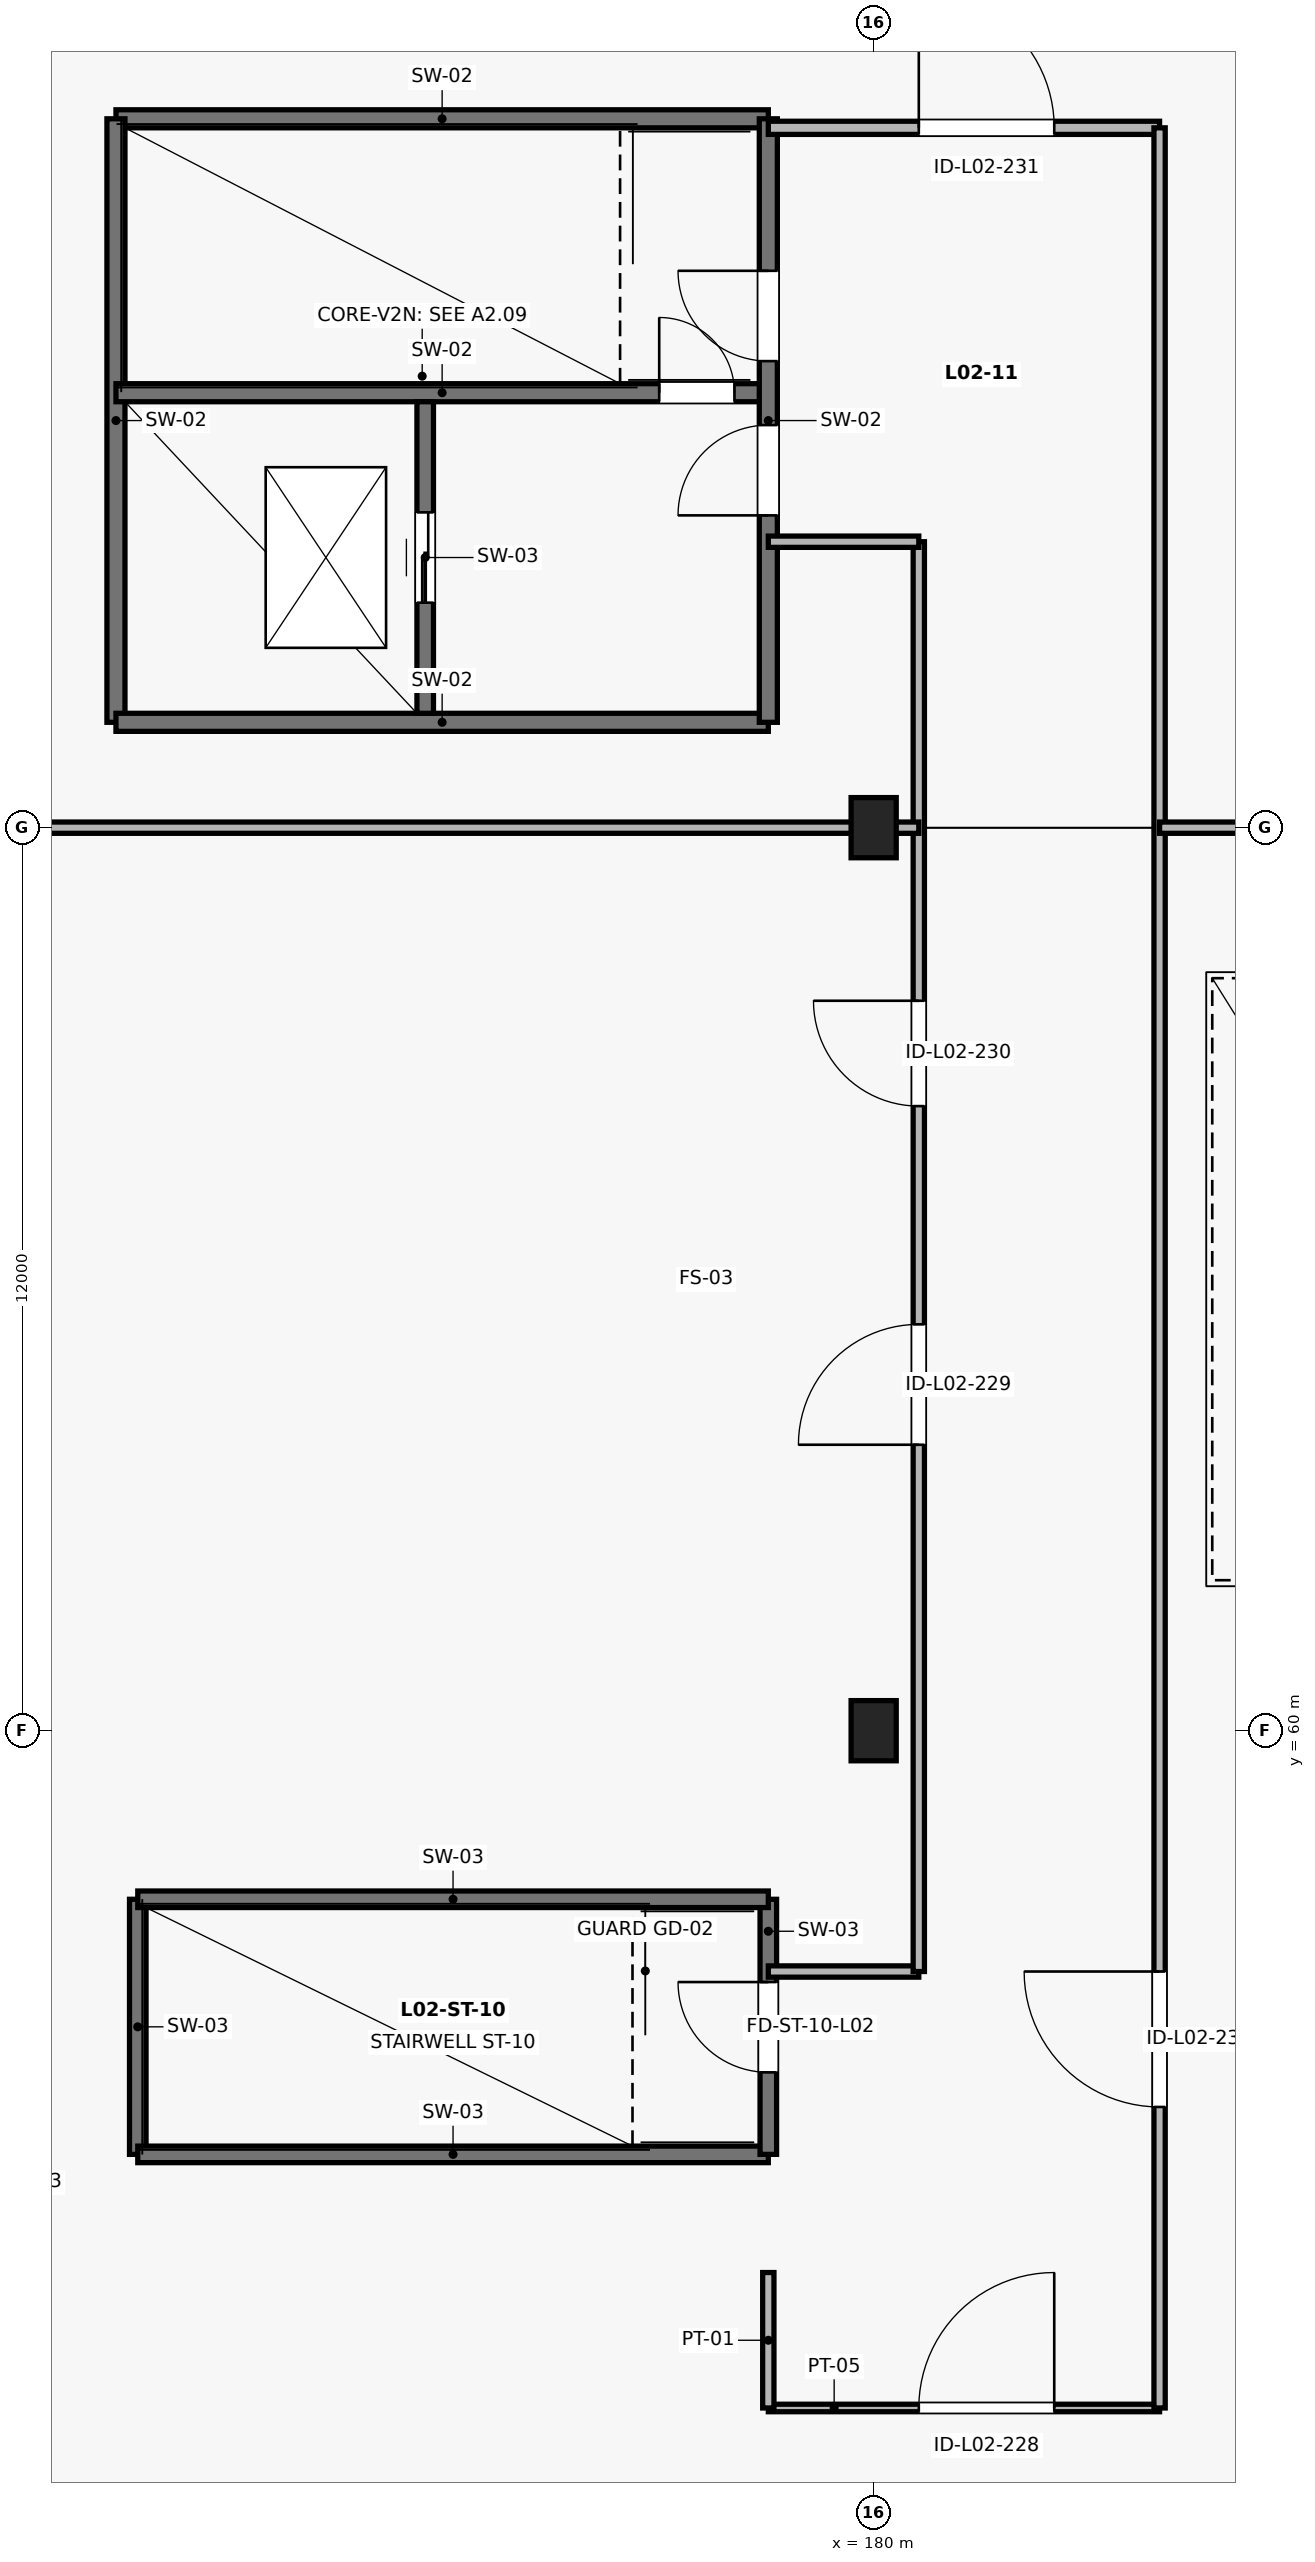
"""IFC4 building model, lengths in metres.
Left out: names, types, materials, properties, quantities, classifications, styles, units other than length and angle.
Written with IfcOpenShell. Run it as: python <this file> out.ifc"""

import sys

from ifc_helpers import new_model, si_unit, direction, frame, frame_2d, origin, origin_2d, place, context, subcontext, project, spatial, rectangle, extrude, element, fill, save


model = new_model("IFC4")
c1 = context("Model", 3, precision=1e-05, world=origin(), true_north=direction((0.0, 1.0)))
c2 = subcontext(c1, "Body", "Model", "MODEL_VIEW")
j1 = project(units=[si_unit("LENGTHUNIT", "METRE"), si_unit("PLANEANGLEUNIT", "RADIAN")], contexts=[c1])
p1 = place(None, origin())
s1 = spatial("IfcSite", under=j1, at=p1, CompositionType="ELEMENT")
p2 = place(p1, origin())
s2 = spatial("IfcBuilding", under=s1, at=p2, CompositionType="ELEMENT")
p3 = place(p2, frame((0.0, 0.0, 11.4)))
s3 = spatial("IfcBuildingStorey", under=s2, at=p3, CompositionType="ELEMENT", Elevation=11.4)
for number, where, z_axis, x_axis in (
    (1, (180.0, 60.0, 0.0), (0.0, 0.0, 1.0), (1.0, 0.0, 0.0)),
    (2, (180.0, 72.0, 0.0), (0.0, 0.0, 1.0), (1.0, 0.0, 0.0)),
):
    element("IfcColumn", number, at=place(p3, frame(where, z_axis=z_axis, x_axis=x_axis)), inside=s3, PredefinedType="COLUMN", context=c2, shape_type="SweptSolid", body=[
        extrude(rectangle(XDim=0.6, YDim=0.8, at=origin_2d()), origin(), (0.0, 0.0, 1.0), 4.8),
    ])
p4 = place(p3, frame((178.6, 81.42, 0.0), z_axis=(0.0, 0.0, 1.0), x_axis=(-1.0, 0.0, 0.0)))
e3 = element("IfcWall", 3, at=p4, inside=s3, PredefinedType="SHEAR", context=c2, shape_type="SweptSolid", body=[
    extrude(rectangle(XDim=8.67, YDim=0.24, at=frame_2d((4.335, 0.0))), origin(), (0.0, 0.0, 1.0), 4.59),
])
p5 = place(p3, frame((169.93, 81.42, 0.0), z_axis=(0.0, 0.0, 1.0), x_axis=(0.0, -1.0, 0.0)))
e4 = element("IfcWall", 4, at=p5, inside=s3, PredefinedType="SHEAR", context=c2, shape_type="SweptSolid", body=[
    extrude(rectangle(XDim=8.02, YDim=0.24, at=frame_2d((4.01, 0.0))), origin(), (0.0, 0.0, 1.0), 4.59),
])
p6 = place(p3, frame((169.93, 73.4, 0.0), z_axis=(0.0, 0.0, 1.0), x_axis=(1.0, 0.0, 0.0)))
e5 = element("IfcWall", 5, at=p6, inside=s3, PredefinedType="SHEAR", context=c2, shape_type="SweptSolid", body=[
    extrude(rectangle(XDim=8.67, YDim=0.24, at=frame_2d((4.335, 0.0))), origin(), (0.0, 0.0, 1.0), 4.59),
])
p7 = place(p3, frame((169.93, 77.78, 0.0), z_axis=(0.0, 0.0, 1.0), x_axis=(1.0, 0.0, 0.0)))
e6 = element("IfcWall", 6, at=p7, inside=s3, PredefinedType="SHEAR", context=c2, shape_type="SweptSolid", body=[
    extrude(rectangle(XDim=8.67, YDim=0.24, at=frame_2d((4.335, 0.0))), origin(), (0.0, 0.0, 1.0), 4.59),
])
p8 = place(p7, frame((7.22, 0.0, 0.0)))
e7 = element("IfcOpeningElement", 7, at=p8, cuts=e6, PredefinedType="OPENING", context=c2, shape_type="SweptSolid", body=[
    extrude(rectangle(XDim=1.0, YDim=2.2, at=frame_2d((0.5, 1.1))), frame((0.0, 0.135, 0.0), z_axis=(0.0, -1.0, 0.0), x_axis=(1.0, 0.0, 0.0)), (0.0, 0.0, 1.0), 0.27),
])
p9 = place(p3, frame((178.6, 73.4, 0.0), z_axis=(0.0, 0.0, 1.0), x_axis=(0.0, 1.0, 0.0)))
e8 = element("IfcWall", 8, at=p9, inside=s3, PredefinedType="SHEAR", context=c2, shape_type="SweptSolid", body=[
    extrude(rectangle(XDim=8.02, YDim=0.24, at=frame_2d((4.01, 0.0))), origin(), (0.0, 0.0, 1.0), 4.59),
])
p10 = place(p9, frame((2.75, 0.0, 0.0)))
e9 = element("IfcOpeningElement", 9, at=p10, cuts=e8, PredefinedType="OPENING", context=c2, shape_type="SweptSolid", body=[
    extrude(rectangle(XDim=1.2, YDim=2.2, at=frame_2d((0.6, 1.1))), frame((0.0, 0.135, 0.0), z_axis=(0.0, -1.0, 0.0), x_axis=(1.0, 0.0, 0.0)), (0.0, 0.0, 1.0), 0.27),
])
p11 = place(p9, frame((4.8, 0.0, 0.0)))
e10 = element("IfcOpeningElement", 10, at=p11, cuts=e8, PredefinedType="OPENING", context=c2, shape_type="SweptSolid", body=[
    extrude(rectangle(XDim=1.2, YDim=2.2, at=frame_2d((0.6, 1.1))), frame((0.0, 0.135, 0.0), z_axis=(0.0, -1.0, 0.0), x_axis=(1.0, 0.0, 0.0)), (0.0, 0.0, 1.0), 0.27),
])
p12 = place(p3, frame((174.04, 73.52, 0.0), z_axis=(0.0, 0.0, 1.0), x_axis=(0.0, 1.0, 0.0)))
e11 = element("IfcWall", 11, at=p12, inside=s3, PredefinedType="SHEAR", context=c2, shape_type="SweptSolid", body=[
    extrude(rectangle(XDim=4.14, YDim=0.22, at=frame_2d((2.07, 0.0))), origin(), (0.0, 0.0, 1.0), 4.59),
])
p13 = place(p12, frame((1.47, 0.0, 0.0)))
e12 = element("IfcOpeningElement", 12, at=p13, cuts=e11, PredefinedType="OPENING", context=c2, shape_type="SweptSolid", body=[
    extrude(rectangle(XDim=1.2, YDim=2.2, at=frame_2d((0.6, 1.1))), frame((0.0, 0.125, 0.0), z_axis=(0.0, -1.0, 0.0), x_axis=(1.0, 0.0, 0.0)), (0.0, 0.0, 1.0), 0.25),
])
p14 = place(p3, frame((170.22, 57.76, 0.0), z_axis=(0.0, 0.0, 1.0), x_axis=(0.0, -1.0, 0.0)))
e13 = element("IfcWall", 13, at=p14, inside=s3, PredefinedType="SHEAR", context=c2, shape_type="SweptSolid", body=[
    extrude(rectangle(XDim=3.39, YDim=0.22, at=frame_2d((1.695, 0.0))), origin(), (0.0, 0.0, 1.0), 4.59),
])
p15 = place(p3, frame((170.22, 54.37, 0.0), z_axis=(0.0, 0.0, 1.0), x_axis=(1.0, 0.0, 0.0)))
e14 = element("IfcWall", 14, at=p15, inside=s3, PredefinedType="SHEAR", context=c2, shape_type="SweptSolid", body=[
    extrude(rectangle(XDim=8.38, YDim=0.22, at=frame_2d((4.19, 0.0))), origin(), (0.0, 0.0, 1.0), 4.59),
])
p16 = place(p3, frame((178.6, 54.37, 0.0), z_axis=(0.0, 0.0, 1.0), x_axis=(0.0, 1.0, 0.0)))
e15 = element("IfcWall", 15, at=p16, inside=s3, PredefinedType="SHEAR", context=c2, shape_type="SweptSolid", body=[
    extrude(rectangle(XDim=3.39, YDim=0.22, at=frame_2d((1.695, 0.0))), origin(), (0.0, 0.0, 1.0), 4.59),
])
p17 = place(p16, frame((1.09, 0.0, 0.0)))
e16 = element("IfcOpeningElement", 16, at=p17, cuts=e15, PredefinedType="OPENING", context=c2, shape_type="SweptSolid", body=[
    extrude(rectangle(XDim=1.2, YDim=2.2, at=frame_2d((0.6, 1.1))), frame((0.0, 0.125, 0.0), z_axis=(0.0, -1.0, 0.0), x_axis=(1.0, 0.0, 0.0)), (0.0, 0.0, 1.0), 0.25),
])
p18 = place(p3, frame((178.6, 57.76, 0.0), z_axis=(0.0, 0.0, 1.0), x_axis=(-1.0, 0.0, 0.0)))
e17 = element("IfcWall", 17, at=p18, inside=s3, PredefinedType="SHEAR", context=c2, shape_type="SweptSolid", body=[
    extrude(rectangle(XDim=8.38, YDim=0.22, at=frame_2d((4.19, 0.0))), origin(), (0.0, 0.0, 1.0), 4.59),
])
p19 = place(p3, frame((178.6, 51.0, 0.0), z_axis=(0.0, 0.0, 1.0), x_axis=(1.0, 0.0, 0.0)))
e18 = element("IfcWall", 18, at=p19, inside=s3, PredefinedType="PARTITIONING", context=c2, shape_type="SweptSolid", body=[
    extrude(rectangle(XDim=5.2, YDim=0.1, at=frame_2d((2.6, 0.0))), origin(), (0.0, 0.0, 1.0), 3.885),
])
p20 = place(p19, frame((2.0, 0.0, 0.0)))
e19 = element("IfcOpeningElement", 19, at=p20, cuts=e18, PredefinedType="OPENING", context=c2, shape_type="SweptSolid", body=[
    extrude(rectangle(XDim=1.8, YDim=2.2, at=frame_2d((0.9, 1.1))), frame((0.0, 0.065, 0.0), z_axis=(0.0, -1.0, 0.0), x_axis=(1.0, 0.0, 0.0)), (0.0, 0.0, 1.0), 0.13),
])
p21 = place(p3, frame((178.6, 51.0, 0.0), z_axis=(0.0, 0.0, 1.0), x_axis=(0.0, 1.0, 0.0)))
e20 = element("IfcWall", 20, at=p21, inside=s3, PredefinedType="PARTITIONING", context=c2, shape_type="SweptSolid", body=[
    extrude(rectangle(XDim=1.8, YDim=0.15, at=frame_2d((0.9, 0.0))), origin(), (0.0, 0.0, 1.0), 4.52),
])
p22 = place(p3, frame((178.6, 56.8, 0.0), z_axis=(0.0, 0.0, 1.0), x_axis=(1.0, 0.0, 0.0)))
e21 = element("IfcWall", 21, at=p22, inside=s3, PredefinedType="PARTITIONING", context=c2, shape_type="SweptSolid", body=[
    extrude(rectangle(XDim=2.0, YDim=0.15, at=frame_2d((1.0, 0.0))), origin(), (0.0, 0.0, 1.0), 3.885),
])
p23 = place(p3, frame((180.6, 56.8, 0.0), z_axis=(0.0, 0.0, 1.0), x_axis=(0.0, 1.0, 0.0)))
e22 = element("IfcWall", 22, at=p23, inside=s3, PredefinedType="PARTITIONING", context=c2, shape_type="SweptSolid", body=[
    extrude(rectangle(XDim=19.0, YDim=0.15, at=frame_2d((9.5, 0.0))), origin(), (0.0, 0.0, 1.0), 3.505),
])
p24 = place(p23, frame((7.0, 0.0, 0.0)))
e23 = element("IfcOpeningElement", 23, at=p24, cuts=e22, PredefinedType="OPENING", context=c2, shape_type="SweptSolid", body=[
    extrude(rectangle(XDim=1.6, YDim=2.2, at=frame_2d((0.8, 1.1))), frame((0.0, 0.09, 0.0), z_axis=(0.0, -1.0, 0.0), x_axis=(1.0, 0.0, 0.0)), (0.0, 0.0, 1.0), 0.18),
])
p25 = place(p23, frame((11.5, 0.0, 0.0)))
e24 = element("IfcOpeningElement", 24, at=p25, cuts=e22, PredefinedType="OPENING", context=c2, shape_type="SweptSolid", body=[
    extrude(rectangle(XDim=1.4, YDim=2.2, at=frame_2d((0.7, 1.1))), frame((0.0, 0.09, 0.0), z_axis=(0.0, -1.0, 0.0), x_axis=(1.0, 0.0, 0.0)), (0.0, 0.0, 1.0), 0.18),
])
p26 = place(p3, frame((178.6, 75.8, 0.0), z_axis=(0.0, 0.0, 1.0), x_axis=(1.0, 0.0, 0.0)))
e25 = element("IfcWall", 25, at=p26, inside=s3, PredefinedType="PARTITIONING", context=c2, shape_type="SweptSolid", body=[
    extrude(rectangle(XDim=2.0, YDim=0.15, at=frame_2d((1.0, 0.0))), origin(), (0.0, 0.0, 1.0), 4.203),
])
p27 = place(p3, frame((178.6, 81.3, 0.0), z_axis=(0.0, 0.0, 1.0), x_axis=(1.0, 0.0, 0.0)))
e26 = element("IfcWall", 26, at=p27, inside=s3, PredefinedType="PARTITIONING", context=c2, shape_type="SweptSolid", body=[
    extrude(rectangle(XDim=5.2, YDim=0.175, at=frame_2d((2.6, 0.0))), origin(), (0.0, 0.0, 1.0), 4.203),
])
p28 = place(p27, frame((2.0, 0.0, 0.0)))
e27 = element("IfcOpeningElement", 27, at=p28, cuts=e26, PredefinedType="OPENING", context=c2, shape_type="SweptSolid", body=[
    extrude(rectangle(XDim=1.8, YDim=2.2, at=frame_2d((0.9, 1.1))), frame((0.0, 0.103, 0.0), z_axis=(0.0, -1.0, 0.0), x_axis=(1.0, 0.0, 0.0)), (0.0, 0.0, 1.0), 0.205),
])
p29 = place(p3, frame((183.8, 51.0, 0.0), z_axis=(0.0, 0.0, 1.0), x_axis=(0.0, 1.0, 0.0)))
e28 = element("IfcWall", 28, at=p29, inside=s3, PredefinedType="PARTITIONING", context=c2, shape_type="SweptSolid", body=[
    extrude(rectangle(XDim=30.3, YDim=0.15, at=frame_2d((15.15, 0.0))), origin(), (0.0, 0.0, 1.0), 3.505),
])
p30 = place(p29, frame((4.0, 0.0, 0.0)))
e29 = element("IfcOpeningElement", 29, at=p30, cuts=e28, PredefinedType="OPENING", context=c2, shape_type="SweptSolid", body=[
    extrude(rectangle(XDim=1.8, YDim=2.2, at=frame_2d((0.9, 1.1))), frame((0.0, 0.09, 0.0), z_axis=(0.0, -1.0, 0.0), x_axis=(1.0, 0.0, 0.0)), (0.0, 0.0, 1.0), 0.18),
])
p31 = place(p3, frame((168.0, 72.0, 0.0), z_axis=(0.0, 0.0, 1.0), x_axis=(1.0, 0.0, 0.0)))
e30 = element("IfcWall", 30, at=p31, inside=s3, PredefinedType="PARTITIONING", context=c2, shape_type="SweptSolid", body=[
    extrude(rectangle(XDim=12.6, YDim=0.15, at=frame_2d((6.3, 0.0))), origin(), (0.0, 0.0, 1.0), 3.385),
])
p32 = place(p3, frame((183.8, 72.0, 0.0), z_axis=(0.0, 0.0, 1.0), x_axis=(1.0, 0.0, 0.0)))
e31 = element("IfcWall", 31, at=p32, inside=s3, PredefinedType="PARTITIONING", context=c2, shape_type="SweptSolid", body=[
    extrude(rectangle(XDim=8.02, YDim=0.15, at=frame_2d((4.01, 0.0))), origin(), (0.0, 0.0, 1.0), 3.505),
])
p33 = place(p10, origin())
e32 = element("IfcDoor", 32, at=p33, inside=s3, OperationType="SINGLE_SWING_LEFT", PredefinedType="DOOR", context=c2, shape_type="SweptSolid", body=[
    extrude(rectangle(XDim=1.2, YDim=2.2, at=frame_2d((0.6, 1.1))), frame((0.0, 0.025, 0.0), z_axis=(0.0, -1.0, 0.0), x_axis=(1.0, 0.0, 0.0)), (0.0, 0.0, 1.0), 0.05),
])
fill(e9, e32)
p34 = place(p11, origin())
e33 = element("IfcDoor", 33, at=p34, inside=s3, OperationType="SINGLE_SWING_RIGHT", PredefinedType="DOOR", context=c2, shape_type="SweptSolid", body=[
    extrude(rectangle(XDim=1.2, YDim=2.2, at=frame_2d((0.6, 1.1))), frame((0.0, 0.025, 0.0), z_axis=(0.0, -1.0, 0.0), x_axis=(1.0, 0.0, 0.0)), (0.0, 0.0, 1.0), 0.05),
])
fill(e10, e33)
p35 = place(p8, origin())
e34 = element("IfcDoor", 34, at=p35, inside=s3, OperationType="SINGLE_SWING_LEFT", PredefinedType="DOOR", context=c2, shape_type="SweptSolid", body=[
    extrude(rectangle(XDim=1.0, YDim=2.2, at=frame_2d((0.5, 1.1))), frame((0.0, 0.025, 0.0), z_axis=(0.0, -1.0, 0.0), x_axis=(1.0, 0.0, 0.0)), (0.0, 0.0, 1.0), 0.05),
])
fill(e7, e34)
p36 = place(p13, origin())
e35 = element("IfcDoor", 35, at=p36, inside=s3, OperationType="DOUBLE_DOOR_SLIDING", PredefinedType="DOOR", context=c2, shape_type="SweptSolid", body=[
    extrude(rectangle(XDim=1.2, YDim=2.2, at=frame_2d((0.6, 1.1))), frame((0.0, 0.025, 0.0), z_axis=(0.0, -1.0, 0.0), x_axis=(1.0, 0.0, 0.0)), (0.0, 0.0, 1.0), 0.05),
])
fill(e12, e35)
p37 = place(p17, origin())
e36 = element("IfcDoor", 36, at=p37, inside=s3, OperationType="SINGLE_SWING_RIGHT", PredefinedType="DOOR", context=c2, shape_type="SweptSolid", body=[
    extrude(rectangle(XDim=1.2, YDim=2.2, at=frame_2d((0.6, 1.1))), frame((0.0, 0.025, 0.0), z_axis=(0.0, -1.0, 0.0), x_axis=(1.0, 0.0, 0.0)), (0.0, 0.0, 1.0), 0.05),
])
fill(e16, e36)
p38 = place(p20, origin())
e37 = element("IfcDoor", 37, at=p38, inside=s3, OperationType="SINGLE_SWING_RIGHT", PredefinedType="DOOR", context=c2, shape_type="SweptSolid", body=[
    extrude(rectangle(XDim=1.8, YDim=2.2, at=frame_2d((0.9, 1.1))), frame((0.0, 0.025, 0.0), z_axis=(0.0, -1.0, 0.0), x_axis=(1.0, 0.0, 0.0)), (0.0, 0.0, 1.0), 0.05),
])
fill(e19, e37)
p39 = place(p24, origin())
e38 = element("IfcDoor", 38, at=p39, inside=s3, OperationType="SINGLE_SWING_LEFT", PredefinedType="DOOR", context=c2, shape_type="SweptSolid", body=[
    extrude(rectangle(XDim=1.6, YDim=2.2, at=frame_2d((0.8, 1.1))), frame((0.0, 0.025, 0.0), z_axis=(0.0, -1.0, 0.0), x_axis=(1.0, 0.0, 0.0)), (0.0, 0.0, 1.0), 0.05),
])
fill(e23, e38)
p40 = place(p25, origin())
e39 = element("IfcDoor", 39, at=p40, inside=s3, OperationType="SINGLE_SWING_RIGHT", PredefinedType="DOOR", context=c2, shape_type="SweptSolid", body=[
    extrude(rectangle(XDim=1.4, YDim=2.2, at=frame_2d((0.7, 1.1))), frame((0.0, 0.025, 0.0), z_axis=(0.0, -1.0, 0.0), x_axis=(1.0, 0.0, 0.0)), (0.0, 0.0, 1.0), 0.05),
])
fill(e24, e39)
p41 = place(p28, origin())
e40 = element("IfcDoor", 40, at=p41, inside=s3, OperationType="SINGLE_SWING_LEFT", PredefinedType="DOOR", context=c2, shape_type="SweptSolid", body=[
    extrude(rectangle(XDim=1.8, YDim=2.2, at=frame_2d((0.9, 1.1))), frame((0.0, 0.025, 0.0), z_axis=(0.0, -1.0, 0.0), x_axis=(1.0, 0.0, 0.0)), (0.0, 0.0, 1.0), 0.05),
])
fill(e27, e40)
p42 = place(p30, origin())
e41 = element("IfcDoor", 41, at=p42, inside=s3, OperationType="SINGLE_SWING_RIGHT", PredefinedType="DOOR", context=c2, shape_type="SweptSolid", body=[
    extrude(rectangle(XDim=1.8, YDim=2.2, at=frame_2d((0.9, 1.1))), frame((0.0, 0.025, 0.0), z_axis=(0.0, -1.0, 0.0), x_axis=(1.0, 0.0, 0.0)), (0.0, 0.0, 1.0), 0.05),
])
fill(e29, e41)
save(model, sys.argv[1])
